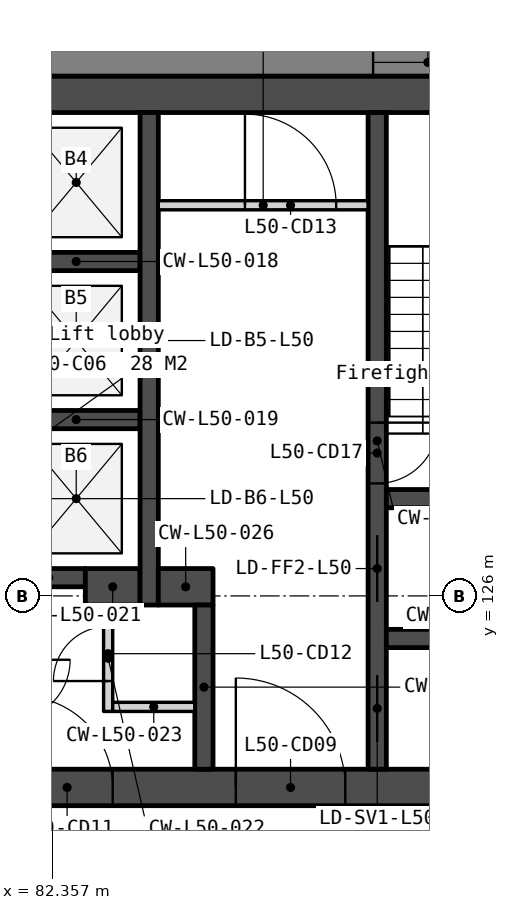
"""IFC4 building model, lengths in metres.
Left out: names, types, materials, properties, quantities, classifications, styles, units other than length and angle.
Written with IfcOpenShell. Run it as: python <this file> out.ifc"""

import sys

from ifc_helpers import new_model, si_unit, direction, frame, frame_2d, origin, place, context, subcontext, project, spatial, polyline, rectangle, outline, extrude, element, fill, save


model = new_model("IFC4")
c1 = context("Model", 3, precision=1e-05, world=origin(), true_north=direction((0.0, 1.0)))
c2 = subcontext(c1, "Body", "Model", "MODEL_VIEW")
j1 = project(units=[si_unit("LENGTHUNIT", "METRE"), si_unit("PLANEANGLEUNIT", "RADIAN")], contexts=[c1])
p1 = place(None, origin())
s1 = spatial("IfcSite", under=j1, at=p1, CompositionType="ELEMENT")
p2 = place(p1, origin())
s2 = spatial("IfcBuilding", under=s1, at=p2, CompositionType="ELEMENT")
p3 = place(p2, frame((0.0, 0.0, 199.7)))
s3 = spatial("IfcBuildingStorey", under=s2, at=p3, CompositionType="ELEMENT", Elevation=199.7)
p4 = place(p3, frame((69.0, 134.25, 0.0), z_axis=(0.0, 0.0, 1.0), x_axis=(1.0, 0.0, 0.0)))
e1 = element("IfcWall", 1, at=p4, inside=s3, PredefinedType="SOLIDWALL", context=c2, shape_type="SweptSolid", body=[
    extrude(rectangle(XDim=22.0, YDim=0.6, at=frame_2d((11.0, 0.0))), origin(), (0.0, 0.0, 1.0), 3.75),
])
p5 = place(p3, frame((69.0, 122.85, 0.0), z_axis=(0.0, 0.0, 1.0), x_axis=(1.0, 0.0, 0.0)))
e2 = element("IfcWall", 2, at=p5, inside=s3, PredefinedType="SOLIDWALL", context=c2, shape_type="SweptSolid", body=[
    extrude(rectangle(XDim=22.0, YDim=0.6, at=frame_2d((11.0, 0.0))), origin(), (0.0, 0.0, 1.0), 3.75),
])
p6 = place(p5, frame((16.375, 0.0, 0.0)))
e3 = element("IfcOpeningElement", 3, at=p6, cuts=e2, PredefinedType="OPENING", context=c2, shape_type="SweptSolid", body=[
    extrude(rectangle(XDim=1.8, YDim=2.1, at=frame_2d((0.9, 1.05))), frame((0.0, 0.31, 0.0), z_axis=(0.0, -1.0, 0.0), x_axis=(1.0, 0.0, 0.0)), (0.0, 0.0, 1.0), 0.62),
])
p7 = place(p5, frame((3.825, 0.0, 0.0)))
e4 = element("IfcOpeningElement", 4, at=p7, cuts=e2, PredefinedType="OPENING", context=c2, shape_type="SweptSolid", body=[
    extrude(rectangle(XDim=1.8, YDim=2.1, at=frame_2d((0.9, 1.05))), frame((0.0, 0.31, 0.0), z_axis=(0.0, -1.0, 0.0), x_axis=(1.0, 0.0, 0.0)), (0.0, 0.0, 1.0), 0.62),
])
p8 = place(p5, frame((12.85, 0.0, 0.0)))
e5 = element("IfcOpeningElement", 5, at=p8, cuts=e2, PredefinedType="OPENING", context=c2, shape_type="SweptSolid", body=[
    extrude(rectangle(XDim=1.5, YDim=2.1, at=frame_2d((0.75, 1.05))), frame((0.0, 0.31, 0.0), z_axis=(0.0, -1.0, 0.0), x_axis=(1.0, 0.0, 0.0)), (0.0, 0.0, 1.0), 0.62),
])
for number, where, z_axis, x_axis in (
    (6, (81.7, 131.5, 0.0), (0.0, 0.0, 1.0), (1.0, 0.0, 0.0)),
    (7, (81.7, 128.9, 0.0), (0.0, 0.0, 1.0), (1.0, 0.0, 0.0)),
):
    element("IfcWall", number, at=place(p3, frame(where, z_axis=z_axis, x_axis=x_axis)), inside=s3, PredefinedType="SOLIDWALL", context=c2, shape_type="SweptSolid", body=[
        extrude(rectangle(XDim=2.1, YDim=0.3, at=frame_2d((1.05, 0.0))), origin(), (0.0, 0.0, 1.0), 3.75),
    ])
p9 = place(p3, frame((81.7, 126.3, 0.0), z_axis=(0.0, 0.0, 1.0), x_axis=(1.0, 0.0, 0.0)))
e8 = element("IfcWall", 8, at=p9, inside=s3, PredefinedType="SOLIDWALL", context=c2, shape_type="SweptSolid", body=[
    extrude(rectangle(XDim=1.2, YDim=0.3, at=frame_2d((0.6, 0.0))), origin(), (0.0, 0.0, 1.0), 3.75),
])
p10 = place(p3, frame((82.9, 126.15, 0.0), z_axis=(0.0, 0.0, 1.0), x_axis=(1.0, 0.0, 0.0)))
e9 = element("IfcWall", 9, at=p10, inside=s3, PredefinedType="SOLIDWALL", context=c2, shape_type="SweptSolid", body=[
    extrude(rectangle(XDim=0.9, YDim=0.6, at=frame_2d((0.45, 0.0))), origin(), (0.0, 0.0, 1.0), 3.75),
])
p11 = place(p3, frame((83.275, 125.85, 0.0), z_axis=(0.0, 0.0, 1.0), x_axis=(0.0, -1.0, 0.0)))
e10 = element("IfcWall", 10, at=p11, inside=s3, PredefinedType="PARTITIONING", context=c2, shape_type="SweptSolid", body=[
    extrude(rectangle(XDim=1.75, YDim=0.15, at=frame_2d((0.875, 0.0))), origin(), (0.0, 0.0, 1.0), 3.75),
])
p12 = place(p11, frame((0.35, 0.0, 0.0)))
e11 = element("IfcOpeningElement", 11, at=p12, cuts=e10, PredefinedType="OPENING", context=c2, shape_type="SweptSolid", body=[
    extrude(rectangle(XDim=0.9, YDim=2.1, at=frame_2d((0.45, 1.05))), frame((0.0, 0.085, 0.0), z_axis=(0.0, -1.0, 0.0), x_axis=(1.0, 0.0, 0.0)), (0.0, 0.0, 1.0), 0.17),
])
p13 = place(p3, frame((83.35, 124.175, 0.0), z_axis=(0.0, 0.0, 1.0), x_axis=(1.0, 0.0, 0.0)))
e12 = element("IfcWall", 12, at=p13, inside=s3, PredefinedType="PARTITIONING", context=c2, shape_type="SweptSolid", body=[
    extrude(rectangle(XDim=1.35, YDim=0.15, at=frame_2d((0.675, 0.0))), origin(), (0.0, 0.0, 1.0), 3.75),
])
p14 = place(p3, frame((83.95, 133.95, 0.0), z_axis=(0.0, 0.0, 1.0), x_axis=(0.0, -1.0, 0.0)))
e13 = element("IfcWall", 13, at=p14, inside=s3, PredefinedType="SOLIDWALL", context=c2, shape_type="SweptSolid", body=[
    extrude(rectangle(XDim=8.1, YDim=0.3, at=frame_2d((4.05, 0.0))), origin(), (0.0, 0.0, 1.0), 3.75),
])
p15 = place(p3, frame((84.1, 132.425, 0.0), z_axis=(0.0, 0.0, 1.0), x_axis=(1.0, 0.0, 0.0)))
e14 = element("IfcWall", 14, at=p15, inside=s3, PredefinedType="PARTITIONING", context=c2, shape_type="SweptSolid", body=[
    extrude(rectangle(XDim=3.45, YDim=0.15, at=frame_2d((1.725, 0.0))), origin(), (0.0, 0.0, 1.0), 3.75),
])
p16 = place(p15, frame((1.425, 0.0, 0.0)))
e15 = element("IfcOpeningElement", 15, at=p16, cuts=e14, PredefinedType="OPENING", context=c2, shape_type="SweptSolid", body=[
    extrude(rectangle(XDim=1.5, YDim=2.1, at=frame_2d((0.75, 1.05))), frame((0.0, 0.085, 0.0), z_axis=(0.0, -1.0, 0.0), x_axis=(1.0, 0.0, 0.0)), (0.0, 0.0, 1.0), 0.17),
])
p17 = place(p3, frame((84.1, 126.15, 0.0), z_axis=(0.0, 0.0, 1.0), x_axis=(1.0, 0.0, 0.0)))
e16 = element("IfcWall", 16, at=p17, inside=s3, PredefinedType="SOLIDWALL", context=c2, shape_type="SweptSolid", body=[
    extrude(rectangle(XDim=0.9, YDim=0.6, at=frame_2d((0.45, 0.0))), origin(), (0.0, 0.0, 1.0), 3.75),
])
p18 = place(p3, frame((84.85, 125.85, 0.0), z_axis=(0.0, 0.0, 1.0), x_axis=(0.0, -1.0, 0.0)))
e17 = element("IfcWall", 17, at=p18, inside=s3, PredefinedType="SOLIDWALL", context=c2, shape_type="SweptSolid", body=[
    extrude(rectangle(XDim=2.7, YDim=0.3, at=frame_2d((1.35, 0.0))), origin(), (0.0, 0.0, 1.0), 3.75),
])
p19 = place(p3, frame((87.7, 133.95, 0.0), z_axis=(0.0, 0.0, 1.0), x_axis=(0.0, -1.0, 0.0)))
e18 = element("IfcWall", 18, at=p19, inside=s3, PredefinedType="SOLIDWALL", context=c2, shape_type="SweptSolid", body=[
    extrude(rectangle(XDim=10.8, YDim=0.3, at=frame_2d((5.4, 0.0))), origin(), (0.0, 0.0, 1.0), 3.75),
])
p20 = place(p19, frame((6.95, 0.0, 0.0)))
e19 = element("IfcOpeningElement", 19, at=p20, cuts=e18, PredefinedType="OPENING", context=c2, shape_type="SweptSolid", body=[
    extrude(rectangle(XDim=1.1, YDim=2.1, at=frame_2d((0.55, 1.05))), frame((0.0, 0.16, 0.0), z_axis=(0.0, -1.0, 0.0), x_axis=(1.0, 0.0, 0.0)), (0.0, 0.0, 1.0), 0.32),
])
p21 = place(p19, frame((5.1, 0.0, 0.0)))
e20 = element("IfcOpeningElement", 20, at=p21, cuts=e18, PredefinedType="OPENING", context=c2, shape_type="SweptSolid", body=[
    extrude(rectangle(XDim=1.0, YDim=2.1, at=frame_2d((0.5, 1.05))), frame((0.0, 0.16, 0.0), z_axis=(0.0, -1.0, 0.0), x_axis=(1.0, 0.0, 0.0)), (0.0, 0.0, 1.0), 0.32),
])
p22 = place(p19, frame((9.25, 0.0, 0.0)))
e21 = element("IfcOpeningElement", 21, at=p22, cuts=e18, PredefinedType="OPENING", context=c2, shape_type="SweptSolid", body=[
    extrude(rectangle(XDim=1.1, YDim=2.1, at=frame_2d((0.55, 1.05))), frame((0.0, 0.16, 0.0), z_axis=(0.0, -1.0, 0.0), x_axis=(1.0, 0.0, 0.0)), (0.0, 0.0, 1.0), 0.32),
])
for number, where, z_axis, x_axis in (
    (22, (87.85, 127.6, 0.0), (0.0, 0.0, 1.0), (1.0, 0.0, 0.0)),
    (23, (87.85, 125.3, 0.0), (0.0, 0.0, 1.0), (1.0, 0.0, 0.0)),
):
    element("IfcWall", number, at=place(p3, frame(where, z_axis=z_axis, x_axis=x_axis)), inside=s3, PredefinedType="SOLIDWALL", context=c2, shape_type="SweptSolid", body=[
        extrude(rectangle(XDim=2.55, YDim=0.3, at=frame_2d((1.275, 0.0))), origin(), (0.0, 0.0, 1.0), 3.75),
    ])
p23 = place(p3, frame((99.365, 134.775, -0.15), z_axis=(0.0, 0.0, 1.0), x_axis=(-1.0, 0.0, 0.0)))
e24 = element("IfcWall", 24, at=p23, inside=s3, PredefinedType="SOLIDWALL", context=c2, shape_type="SweptSolid", body=[
    extrude(outline(polyline([(38.729, 0.0), (38.729, 3.9), (0.0, 3.9), (0.0, 0.0), (38.729, 0.0)])), frame((0.0, 0.225, 0.0), z_axis=(0.0, -1.0, 0.0), x_axis=(1.0, 0.0, 0.0)), (0.0, 0.0, 1.0), 0.45),
])
p24 = place(p23, frame((0.776, 0.0, 0.95)))
e25 = element("IfcOpeningElement", 25, at=p24, cuts=e24, PredefinedType="OPENING", context=c2, shape_type="SweptSolid", body=[
    extrude(rectangle(XDim=1.2, YDim=2.2, at=frame_2d((0.6, 1.1))), frame((0.0, 0.235, 0.0), z_axis=(0.0, -1.0, 0.0), x_axis=(1.0, 0.0, 0.0)), (0.0, 0.0, 1.0), 0.47),
])
p25 = place(p23, frame((7.632, 0.0, 0.95)))
e26 = element("IfcOpeningElement", 26, at=p25, cuts=e24, PredefinedType="OPENING", context=c2, shape_type="SweptSolid", body=[
    extrude(rectangle(XDim=1.8, YDim=2.2, at=frame_2d((0.9, 1.1))), frame((0.0, 0.235, 0.0), z_axis=(0.0, -1.0, 0.0), x_axis=(1.0, 0.0, 0.0)), (0.0, 0.0, 1.0), 0.47),
])
p26 = place(p23, frame((9.932, 0.0, 0.95)))
e27 = element("IfcOpeningElement", 27, at=p26, cuts=e24, PredefinedType="OPENING", context=c2, shape_type="SweptSolid", body=[
    extrude(rectangle(XDim=1.8, YDim=2.2, at=frame_2d((0.9, 1.1))), frame((0.0, 0.235, 0.0), z_axis=(0.0, -1.0, 0.0), x_axis=(1.0, 0.0, 0.0)), (0.0, 0.0, 1.0), 0.47),
])
p27 = place(p23, frame((17.315, 0.0, 0.95)))
e28 = element("IfcOpeningElement", 28, at=p27, cuts=e24, PredefinedType="OPENING", context=c2, shape_type="SweptSolid", body=[
    extrude(rectangle(XDim=1.8, YDim=2.2, at=frame_2d((0.9, 1.1))), frame((0.0, 0.235, 0.0), z_axis=(0.0, -1.0, 0.0), x_axis=(1.0, 0.0, 0.0)), (0.0, 0.0, 1.0), 0.47),
])
p28 = place(p23, frame((19.615, 0.0, 0.95)))
e29 = element("IfcOpeningElement", 29, at=p28, cuts=e24, PredefinedType="OPENING", context=c2, shape_type="SweptSolid", body=[
    extrude(rectangle(XDim=1.8, YDim=2.2, at=frame_2d((0.9, 1.1))), frame((0.0, 0.235, 0.0), z_axis=(0.0, -1.0, 0.0), x_axis=(1.0, 0.0, 0.0)), (0.0, 0.0, 1.0), 0.47),
])
p29 = place(p23, frame((26.997, 0.0, 0.95)))
e30 = element("IfcOpeningElement", 30, at=p29, cuts=e24, PredefinedType="OPENING", context=c2, shape_type="SweptSolid", body=[
    extrude(rectangle(XDim=1.8, YDim=2.2, at=frame_2d((0.9, 1.1))), frame((0.0, 0.235, 0.0), z_axis=(0.0, -1.0, 0.0), x_axis=(1.0, 0.0, 0.0)), (0.0, 0.0, 1.0), 0.47),
])
p30 = place(p23, frame((29.297, 0.0, 0.95)))
e31 = element("IfcOpeningElement", 31, at=p30, cuts=e24, PredefinedType="OPENING", context=c2, shape_type="SweptSolid", body=[
    extrude(rectangle(XDim=1.8, YDim=2.2, at=frame_2d((0.9, 1.1))), frame((0.0, 0.235, 0.0), z_axis=(0.0, -1.0, 0.0), x_axis=(1.0, 0.0, 0.0)), (0.0, 0.0, 1.0), 0.47),
])
p31 = place(p23, frame((36.753, 0.0, 0.95)))
e32 = element("IfcOpeningElement", 32, at=p31, cuts=e24, PredefinedType="OPENING", context=c2, shape_type="SweptSolid", body=[
    extrude(rectangle(XDim=1.2, YDim=2.2, at=frame_2d((0.6, 1.1))), frame((0.0, 0.235, 0.0), z_axis=(0.0, -1.0, 0.0), x_axis=(1.0, 0.0, 0.0)), (0.0, 0.0, 1.0), 0.47),
])
p32 = place(p3, frame((81.505, 98.627, -0.15), z_axis=(0.0, 0.0, 1.0), x_axis=(0.500002199942, 0.866024133644, 0.0)))
e33 = element("IfcWall", 33, at=p32, inside=s3, PredefinedType="SOLIDWALL", context=c2, shape_type="SweptSolid", body=[
    extrude(outline(polyline([(38.729, 0.0), (38.729, 3.9), (0.0, 3.9), (0.0, 0.0), (38.729, 0.0)])), frame((0.0, 0.225, 0.0), z_axis=(0.0, -1.0, 0.0), x_axis=(1.0, 0.0, 0.0)), (0.0, 0.0, 1.0), 0.45),
])
p33 = place(p32, frame((0.776, 0.0, 0.95)))
e34 = element("IfcOpeningElement", 34, at=p33, cuts=e33, PredefinedType="OPENING", context=c2, shape_type="SweptSolid", body=[
    extrude(rectangle(XDim=1.2, YDim=2.2, at=frame_2d((0.6, 1.1))), frame((0.0, 0.235, 0.0), z_axis=(0.0, -1.0, 0.0), x_axis=(1.0, 0.0, 0.0)), (0.0, 0.0, 1.0), 0.47),
])
p34 = place(p32, frame((7.632, 0.0, 0.95)))
e35 = element("IfcOpeningElement", 35, at=p34, cuts=e33, PredefinedType="OPENING", context=c2, shape_type="SweptSolid", body=[
    extrude(rectangle(XDim=1.8, YDim=2.2, at=frame_2d((0.9, 1.1))), frame((0.0, 0.235, 0.0), z_axis=(0.0, -1.0, 0.0), x_axis=(1.0, 0.0, 0.0)), (0.0, 0.0, 1.0), 0.47),
])
p35 = place(p32, frame((9.932, 0.0, 0.95)))
e36 = element("IfcOpeningElement", 36, at=p35, cuts=e33, PredefinedType="OPENING", context=c2, shape_type="SweptSolid", body=[
    extrude(rectangle(XDim=1.8, YDim=2.2, at=frame_2d((0.9, 1.1))), frame((0.0, 0.235, 0.0), z_axis=(0.0, -1.0, 0.0), x_axis=(1.0, 0.0, 0.0)), (0.0, 0.0, 1.0), 0.47),
])
p36 = place(p32, frame((17.315, 0.0, 0.95)))
e37 = element("IfcOpeningElement", 37, at=p36, cuts=e33, PredefinedType="OPENING", context=c2, shape_type="SweptSolid", body=[
    extrude(rectangle(XDim=1.8, YDim=2.2, at=frame_2d((0.9, 1.1))), frame((0.0, 0.235, 0.0), z_axis=(0.0, -1.0, 0.0), x_axis=(1.0, 0.0, 0.0)), (0.0, 0.0, 1.0), 0.47),
])
p37 = place(p32, frame((19.615, 0.0, 0.95)))
e38 = element("IfcOpeningElement", 38, at=p37, cuts=e33, PredefinedType="OPENING", context=c2, shape_type="SweptSolid", body=[
    extrude(rectangle(XDim=1.8, YDim=2.2, at=frame_2d((0.9, 1.1))), frame((0.0, 0.235, 0.0), z_axis=(0.0, -1.0, 0.0), x_axis=(1.0, 0.0, 0.0)), (0.0, 0.0, 1.0), 0.47),
])
p38 = place(p32, frame((26.997, 0.0, 0.95)))
e39 = element("IfcOpeningElement", 39, at=p38, cuts=e33, PredefinedType="OPENING", context=c2, shape_type="SweptSolid", body=[
    extrude(rectangle(XDim=1.8, YDim=2.2, at=frame_2d((0.9, 1.1))), frame((0.0, 0.235, 0.0), z_axis=(0.0, -1.0, 0.0), x_axis=(1.0, 0.0, 0.0)), (0.0, 0.0, 1.0), 0.47),
])
p39 = place(p32, frame((29.297, 0.0, 0.95)))
e40 = element("IfcOpeningElement", 40, at=p39, cuts=e33, PredefinedType="OPENING", context=c2, shape_type="SweptSolid", body=[
    extrude(rectangle(XDim=1.8, YDim=2.2, at=frame_2d((0.9, 1.1))), frame((0.0, 0.235, 0.0), z_axis=(0.0, -1.0, 0.0), x_axis=(1.0, 0.0, 0.0)), (0.0, 0.0, 1.0), 0.47),
])
p40 = place(p32, frame((36.753, 0.0, 0.95)))
e41 = element("IfcOpeningElement", 41, at=p40, cuts=e33, PredefinedType="OPENING", context=c2, shape_type="SweptSolid", body=[
    extrude(rectangle(XDim=1.2, YDim=2.2, at=frame_2d((0.6, 1.1))), frame((0.0, 0.235, 0.0), z_axis=(0.0, -1.0, 0.0), x_axis=(1.0, 0.0, 0.0)), (0.0, 0.0, 1.0), 0.47),
])
p41 = place(p20, origin())
e42 = element("IfcDoor", 42, at=p41, inside=s3, OperationType="SLIDING_TO_LEFT", PredefinedType="DOOR", context=c2, shape_type="SweptSolid", body=[
    extrude(rectangle(XDim=1.1, YDim=2.1, at=frame_2d((0.55, 1.05))), frame((0.0, 0.025, 0.0), z_axis=(0.0, -1.0, 0.0), x_axis=(1.0, 0.0, 0.0)), (0.0, 0.0, 1.0), 0.05),
])
fill(e19, e42)
p42 = place(p6, origin())
e43 = element("IfcDoor", 43, at=p42, inside=s3, OperationType="DOUBLE_DOOR_DOUBLE_SWING", PredefinedType="DOOR", context=c2, shape_type="SweptSolid", body=[
    extrude(rectangle(XDim=1.8, YDim=2.1, at=frame_2d((0.9, 1.05))), frame((0.0, 0.025, 0.0), z_axis=(0.0, -1.0, 0.0), x_axis=(1.0, 0.0, 0.0)), (0.0, 0.0, 1.0), 0.05),
])
fill(e3, e43)
p43 = place(p8, origin())
e44 = element("IfcDoor", 44, at=p43, inside=s3, OperationType="DOUBLE_DOOR_DOUBLE_SWING", PredefinedType="DOOR", context=c2, shape_type="SweptSolid", body=[
    extrude(rectangle(XDim=1.5, YDim=2.1, at=frame_2d((0.75, 1.05))), frame((0.0, 0.025, 0.0), z_axis=(0.0, -1.0, 0.0), x_axis=(1.0, 0.0, 0.0)), (0.0, 0.0, 1.0), 0.05),
])
fill(e5, e44)
p44 = place(p12, origin())
e45 = element("IfcDoor", 45, at=p44, inside=s3, OperationType="SINGLE_SWING_RIGHT", PredefinedType="DOOR", context=c2, shape_type="SweptSolid", body=[
    extrude(rectangle(XDim=0.9, YDim=2.1, at=frame_2d((0.45, 1.05))), frame((0.0, 0.025, 0.0), z_axis=(0.0, -1.0, 0.0), x_axis=(1.0, 0.0, 0.0)), (0.0, 0.0, 1.0), 0.05),
])
fill(e11, e45)
p45 = place(p16, origin())
e46 = element("IfcDoor", 46, at=p45, inside=s3, OperationType="DOUBLE_DOOR_DOUBLE_SWING", PredefinedType="DOOR", context=c2, shape_type="SweptSolid", body=[
    extrude(rectangle(XDim=1.5, YDim=2.1, at=frame_2d((0.75, 1.05))), frame((0.0, 0.025, 0.0), z_axis=(0.0, -1.0, 0.0), x_axis=(1.0, 0.0, 0.0)), (0.0, 0.0, 1.0), 0.05),
])
fill(e15, e46)
p46 = place(p21, origin())
e47 = element("IfcDoor", 47, at=p46, inside=s3, OperationType="SINGLE_SWING_LEFT", PredefinedType="DOOR", context=c2, shape_type="SweptSolid", body=[
    extrude(rectangle(XDim=1.0, YDim=2.1, at=frame_2d((0.5, 1.05))), frame((0.0, 0.025, 0.0), z_axis=(0.0, -1.0, 0.0), x_axis=(1.0, 0.0, 0.0)), (0.0, 0.0, 1.0), 0.05),
])
fill(e20, e47)
p47 = place(p22, origin())
e48 = element("IfcDoor", 48, at=p47, inside=s3, OperationType="SLIDING_TO_LEFT", PredefinedType="DOOR", context=c2, shape_type="SweptSolid", body=[
    extrude(rectangle(XDim=1.1, YDim=2.1, at=frame_2d((0.55, 1.05))), frame((0.0, 0.025, 0.0), z_axis=(0.0, -1.0, 0.0), x_axis=(1.0, 0.0, 0.0)), (0.0, 0.0, 1.0), 0.05),
])
fill(e21, e48)
p48 = place(p26, origin())
e49 = element("IfcWindow", 49, at=p48, inside=s3, PartitioningType="SINGLE_PANEL", PredefinedType="WINDOW", context=c2, shape_type="SweptSolid", body=[
    extrude(rectangle(XDim=1.8, YDim=2.2, at=frame_2d((0.9, 1.1))), frame((0.0, 0.03, 0.0), z_axis=(0.0, -1.0, 0.0), x_axis=(1.0, 0.0, 0.0)), (0.0, 0.0, 1.0), 0.06),
])
fill(e27, e49)
save(model, sys.argv[1])
